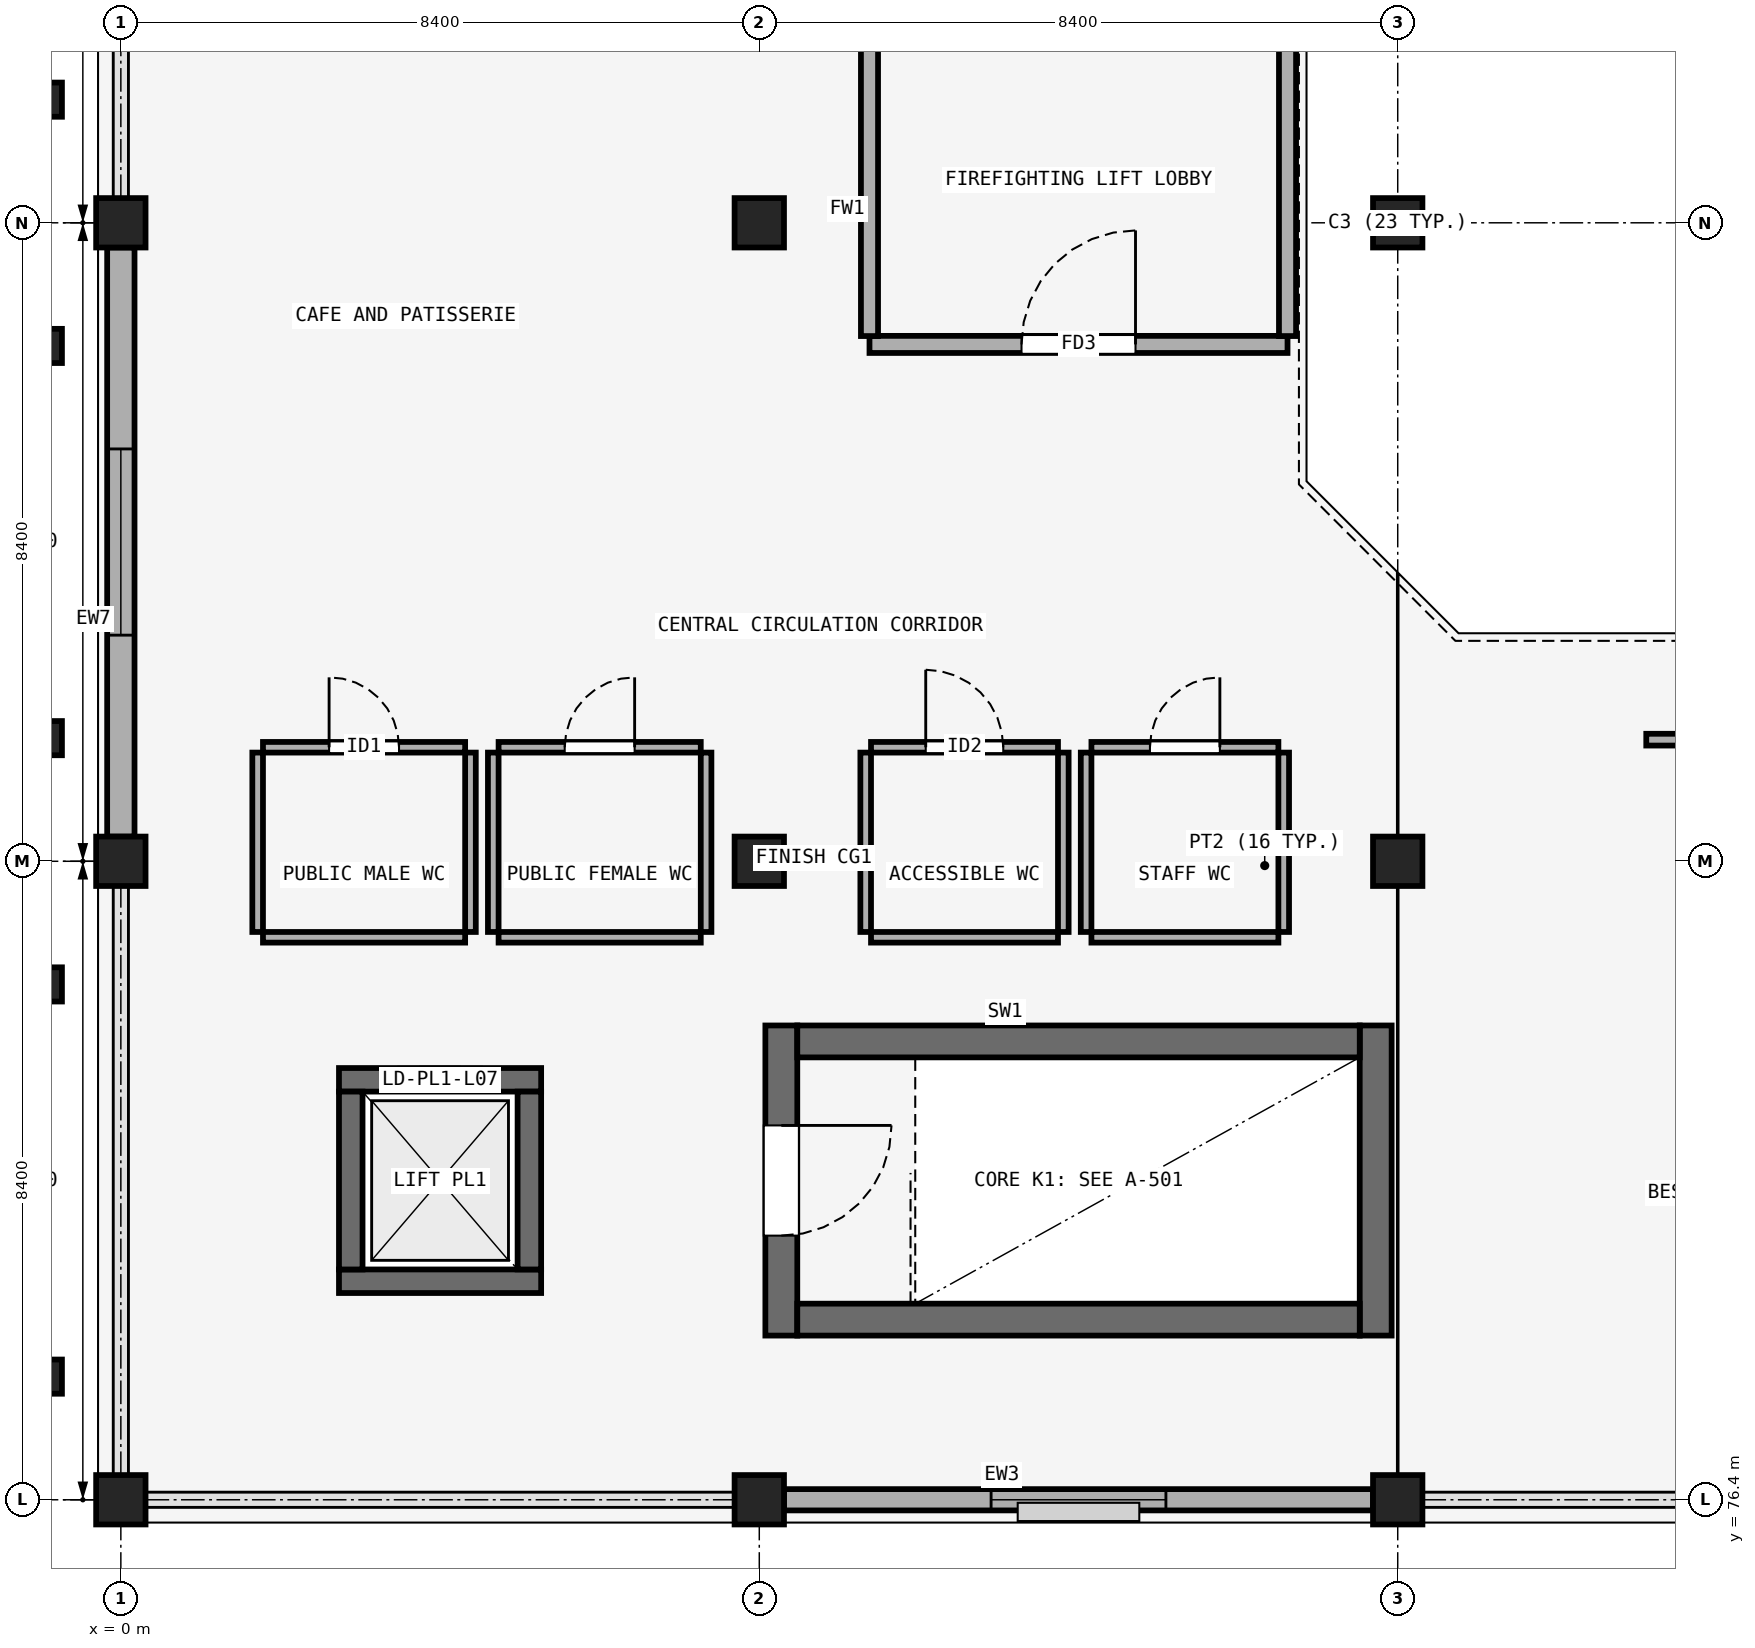
"""IFC4 building model, lengths in metres.
Left out: names, types, materials, properties, quantities, classifications, styles, units other than length and angle.
Written with IfcOpenShell. Run it as: python <this file> out.ifc"""

import sys

from ifc_helpers import new_model, si_unit, direction, frame, frame_2d, origin, origin_2d, place, context, subcontext, project, spatial, rectangle, extrude, element, fill, save


model = new_model("IFC4")
c1 = context("Model", 3, precision=1e-05, world=origin(), true_north=direction((0.0, 1.0)))
c2 = subcontext(c1, "Body", "Model", "MODEL_VIEW")
j1 = project(units=[si_unit("LENGTHUNIT", "METRE"), si_unit("PLANEANGLEUNIT", "RADIAN")], contexts=[c1])
p1 = place(None, origin())
s1 = spatial("IfcSite", under=j1, at=p1, CompositionType="ELEMENT")
p2 = place(p1, origin())
s2 = spatial("IfcBuilding", under=s1, at=p2, CompositionType="ELEMENT")
p3 = place(p2, frame((0.0, 0.0, 32.4)))
s3 = spatial("IfcBuildingStorey", under=s2, at=p3, CompositionType="ELEMENT", Elevation=32.4)
for number, where, z_axis, x_axis in (
    (1, (0.0, 76.4, 0.0), (0.0, 0.0, 1.0), (1.0, 0.0, 0.0)),
    (2, (8.4, 76.4, 0.0), (0.0, 0.0, 1.0), (1.0, 0.0, 0.0)),
    (3, (16.8, 76.4, 0.0), (0.0, 0.0, 1.0), (1.0, 0.0, 0.0)),
    (4, (0.0, 84.8, 0.0), (0.0, 0.0, 1.0), (1.0, 0.0, 0.0)),
    (5, (8.4, 84.8, 0.0), (0.0, 0.0, 1.0), (1.0, 0.0, 0.0)),
    (6, (16.8, 84.8, 0.0), (0.0, 0.0, 1.0), (1.0, 0.0, 0.0)),
    (7, (0.0, 93.2, 0.0), (0.0, 0.0, 1.0), (1.0, 0.0, 0.0)),
    (8, (8.4, 93.2, 0.0), (0.0, 0.0, 1.0), (1.0, 0.0, 0.0)),
    (9, (16.8, 93.2, 0.0), (0.0, 0.0, 1.0), (1.0, 0.0, 0.0)),
):
    element("IfcColumn", number, at=place(p3, frame(where, z_axis=z_axis, x_axis=x_axis)), inside=s3, PredefinedType="COLUMN", context=c2, shape_type="SweptSolid", body=[
        extrude(rectangle(XDim=0.65, YDim=0.65, at=origin_2d()), origin(), (0.0, 0.0, 1.0), 4.5),
    ])
for number, where, z_axis, x_axis in (
    (10, (-1.05, 78.02, 0.0), (0.0, 0.0, 1.0), (0.0, 1.0, 0.0)),
    (11, (-1.05, 83.18, 0.0), (0.0, 0.0, 1.0), (0.0, 1.0, 0.0)),
    (12, (-1.05, 86.42, 0.0), (0.0, 0.0, 1.0), (0.0, 1.0, 0.0)),
    (13, (-1.05, 91.58, 0.0), (0.0, 0.0, 1.0), (0.0, 1.0, 0.0)),
    (14, (-1.05, 94.82, 0.0), (0.0, 0.0, 1.0), (0.0, 1.0, 0.0)),
):
    element("IfcColumn", number, at=place(p3, frame(where, z_axis=z_axis, x_axis=x_axis)), inside=s3, PredefinedType="PILASTER", context=c2, shape_type="SweptSolid", body=[
        extrude(rectangle(XDim=0.45, YDim=0.55, at=origin_2d()), origin(), (0.0, 0.0, 1.0), 4.5),
    ])
p4 = place(p3, frame((8.725, 76.4, 0.0), z_axis=(0.0, 0.0, 1.0), x_axis=(1.0, 0.0, 0.0)))
e15 = element("IfcWall", 15, at=p4, inside=s3, PredefinedType="SOLIDWALL", context=c2, shape_type="SweptSolid", body=[
    extrude(rectangle(XDim=7.75, YDim=0.28, at=frame_2d((3.875, 0.0))), origin(), (0.0, 0.0, 1.0), 3.49),
])
p5 = place(p4, frame((2.725, 0.0, 0.95)))
e16 = element("IfcOpeningElement", 16, at=p5, cuts=e15, PredefinedType="OPENING", context=c2, shape_type="SweptSolid", body=[
    extrude(rectangle(XDim=2.3, YDim=1.35, at=frame_2d((1.15, 0.675))), frame((0.0, 0.15, 0.0), z_axis=(0.0, -1.0, 0.0), x_axis=(1.0, 0.0, 0.0)), (0.0, 0.0, 1.0), 0.3),
])
p6 = place(p3, frame((0.0, 85.125, 0.0), z_axis=(0.0, 0.0, 1.0), x_axis=(0.0, 1.0, 0.0)))
e17 = element("IfcWall", 17, at=p6, inside=s3, PredefinedType="SOLIDWALL", context=c2, shape_type="SweptSolid", body=[
    extrude(rectangle(XDim=7.75, YDim=0.36, at=frame_2d((3.875, 0.0))), origin(), (0.0, 0.0, 1.0), 3.49),
])
p7 = place(p6, frame((2.65, 0.0, 0.95)))
e18 = element("IfcOpeningElement", 18, at=p7, cuts=e17, PredefinedType="OPENING", context=c2, shape_type="SweptSolid", body=[
    extrude(rectangle(XDim=2.45, YDim=1.35, at=frame_2d((1.225, 0.675))), frame((0.0, 0.19, 0.0), z_axis=(0.0, -1.0, 0.0), x_axis=(1.0, 0.0, 0.0)), (0.0, 0.0, 1.0), 0.38),
])
p8 = place(p3, frame((8.69, 82.64, 0.0), z_axis=(0.0, 0.0, 1.0), x_axis=(0.0, -1.0, 0.0)))
e19 = element("IfcWall", 19, at=p8, inside=s3, PredefinedType="SHEAR", context=c2, shape_type="SweptSolid", body=[
    extrude(rectangle(XDim=4.08, YDim=0.42, at=frame_2d((2.04, 0.0))), origin(), (0.0, 0.0, 1.0), 4.24),
])
p9 = place(p8, frame((1.315, 0.0, 0.0)))
e20 = element("IfcOpeningElement", 20, at=p9, cuts=e19, PredefinedType="OPENING", context=c2, shape_type="SweptSolid", body=[
    extrude(rectangle(XDim=1.45, YDim=2.2, at=frame_2d((0.725, 1.1))), frame((0.0, 0.22, 0.0), z_axis=(0.0, -1.0, 0.0), x_axis=(1.0, 0.0, 0.0)), (0.0, 0.0, 1.0), 0.44),
])
p10 = place(p3, frame((16.51, 78.56, 0.0), z_axis=(0.0, 0.0, 1.0), x_axis=(0.0, 1.0, 0.0)))
e21 = element("IfcWall", 21, at=p10, inside=s3, PredefinedType="SHEAR", context=c2, shape_type="SweptSolid", body=[
    extrude(rectangle(XDim=4.08, YDim=0.42, at=frame_2d((2.04, 0.0))), origin(), (0.0, 0.0, 1.0), 4.24),
])
for number, where, z_axis, x_axis in (
    (22, (8.9, 78.77, 0.0), (0.0, 0.0, 1.0), (1.0, 0.0, 0.0)),
    (23, (8.9, 82.43, 0.0), (0.0, 0.0, 1.0), (1.0, 0.0, 0.0)),
):
    element("IfcWall", number, at=place(p3, frame(where, z_axis=z_axis, x_axis=x_axis)), inside=s3, PredefinedType="SHEAR", context=c2, shape_type="SweptSolid", body=[
        extrude(rectangle(XDim=7.4, YDim=0.42, at=frame_2d((3.7, 0.0))), origin(), (0.0, 0.0, 1.0), 4.24),
    ])
p11 = place(p3, frame((2.87, 79.275, 0.0), z_axis=(0.0, 0.0, 1.0), x_axis=(1.0, 0.0, 0.0)))
e24 = element("IfcWall", 24, at=p11, inside=s3, PredefinedType="SHEAR", context=c2, shape_type="SweptSolid", body=[
    extrude(rectangle(XDim=2.66, YDim=0.31, at=frame_2d((1.33, 0.0))), origin(), (0.0, 0.0, 1.0), 5.9),
])
p12 = place(p3, frame((2.87, 81.925, 0.0), z_axis=(0.0, 0.0, 1.0), x_axis=(1.0, 0.0, 0.0)))
e25 = element("IfcWall", 25, at=p12, inside=s3, PredefinedType="SHEAR", context=c2, shape_type="SweptSolid", body=[
    extrude(rectangle(XDim=2.66, YDim=0.31, at=frame_2d((1.33, 0.0))), origin(), (0.0, 0.0, 1.0), 5.9),
])
p13 = place(p12, frame((0.78, 0.0, 0.0)))
e26 = element("IfcOpeningElement", 26, at=p13, cuts=e25, PredefinedType="OPENING", context=c2, shape_type="SweptSolid", body=[
    extrude(rectangle(XDim=1.1, YDim=2.2, at=frame_2d((0.55, 1.1))), frame((0.0, 0.165, 0.0), z_axis=(0.0, -1.0, 0.0), x_axis=(1.0, 0.0, 0.0)), (0.0, 0.0, 1.0), 0.33),
])
for number, where, z_axis, x_axis in (
    (27, (3.025, 79.43, 0.0), (0.0, 0.0, 1.0), (0.0, 1.0, 0.0)),
    (28, (5.375, 79.43, 0.0), (0.0, 0.0, 1.0), (0.0, 1.0, 0.0)),
):
    element("IfcWall", number, at=place(p3, frame(where, z_axis=z_axis, x_axis=x_axis)), inside=s3, PredefinedType="SHEAR", context=c2, shape_type="SweptSolid", body=[
        extrude(rectangle(XDim=2.34, YDim=0.31, at=frame_2d((1.17, 0.0))), origin(), (0.0, 0.0, 1.0), 5.9),
    ])
p14 = place(p3, frame((9.85, 91.6, 0.0), z_axis=(0.0, 0.0, 1.0), x_axis=(1.0, 0.0, 0.0)))
e29 = element("IfcWall", 29, at=p14, inside=s3, PredefinedType="PARTITIONING", context=c2, shape_type="SweptSolid", body=[
    extrude(rectangle(XDim=5.5, YDim=0.225, at=frame_2d((2.75, 0.0))), origin(), (0.0, 0.0, 1.0), 4.24),
])
p15 = place(p14, frame((2.0, 0.0, 0.0)))
e30 = element("IfcOpeningElement", 30, at=p15, cuts=e29, PredefinedType="OPENING", context=c2, shape_type="SweptSolid", body=[
    extrude(rectangle(XDim=1.5, YDim=2.25, at=frame_2d((0.75, 1.125))), frame((0.0, 0.123, 0.0), z_axis=(0.0, -1.0, 0.0), x_axis=(1.0, 0.0, 0.0)), (0.0, 0.0, 1.0), 0.245),
])
for number, where, z_axis, x_axis in (
    (31, (9.85, 91.71, 0.0), (0.0, 0.0, 1.0), (0.0, 1.0, 0.0)),
    (32, (15.35, 91.71, 0.0), (0.0, 0.0, 1.0), (0.0, 1.0, 0.0)),
):
    element("IfcWall", number, at=place(p3, frame(where, z_axis=z_axis, x_axis=x_axis)), inside=s3, PredefinedType="PARTITIONING", context=c2, shape_type="SweptSolid", body=[
        extrude(rectangle(XDim=4.53, YDim=0.225, at=frame_2d((2.265, 0.0))), origin(), (0.0, 0.0, 1.0), 3.54),
    ])
p16 = place(p3, frame((1.87, 86.3, 0.0), z_axis=(0.0, 0.0, 1.0), x_axis=(1.0, 0.0, 0.0)))
e33 = element("IfcWall", 33, at=p16, inside=s3, PredefinedType="PARTITIONING", context=c2, shape_type="SweptSolid", body=[
    extrude(rectangle(XDim=2.66, YDim=0.14, at=frame_2d((1.33, 0.0))), origin(), (0.0, 0.0, 1.0), 4.24),
])
p17 = place(p16, frame((0.87, 0.0, 0.0)))
e34 = element("IfcOpeningElement", 34, at=p17, cuts=e33, PredefinedType="OPENING", context=c2, shape_type="SweptSolid", body=[
    extrude(rectangle(XDim=0.92, YDim=2.12, at=frame_2d((0.46, 1.06))), frame((0.0, 0.08, 0.0), z_axis=(0.0, -1.0, 0.0), x_axis=(1.0, 0.0, 0.0)), (0.0, 0.0, 1.0), 0.16),
])
p18 = place(p3, frame((1.87, 83.8, 0.0), z_axis=(0.0, 0.0, 1.0), x_axis=(1.0, 0.0, 0.0)))
e35 = element("IfcWall", 35, at=p18, inside=s3, PredefinedType="PARTITIONING", context=c2, shape_type="SweptSolid", body=[
    extrude(rectangle(XDim=2.66, YDim=0.14, at=frame_2d((1.33, 0.0))), origin(), (0.0, 0.0, 1.0), 4.24),
])
for number, where, z_axis, x_axis in (
    (36, (1.8, 83.87, 0.0), (0.0, 0.0, 1.0), (0.0, 1.0, 0.0)),
    (37, (4.6, 83.87, 0.0), (0.0, 0.0, 1.0), (0.0, 1.0, 0.0)),
):
    element("IfcWall", number, at=place(p3, frame(where, z_axis=z_axis, x_axis=x_axis)), inside=s3, PredefinedType="PARTITIONING", context=c2, shape_type="SweptSolid", body=[
        extrude(rectangle(XDim=2.36, YDim=0.14, at=frame_2d((1.18, 0.0))), origin(), (0.0, 0.0, 1.0), 3.49),
    ])
p19 = place(p3, frame((4.97, 86.3, 0.0), z_axis=(0.0, 0.0, 1.0), x_axis=(1.0, 0.0, 0.0)))
e38 = element("IfcWall", 38, at=p19, inside=s3, PredefinedType="PARTITIONING", context=c2, shape_type="SweptSolid", body=[
    extrude(rectangle(XDim=2.66, YDim=0.14, at=frame_2d((1.33, 0.0))), origin(), (0.0, 0.0, 1.0), 4.24),
])
p20 = place(p19, frame((0.87, 0.0, 0.0)))
e39 = element("IfcOpeningElement", 39, at=p20, cuts=e38, PredefinedType="OPENING", context=c2, shape_type="SweptSolid", body=[
    extrude(rectangle(XDim=0.92, YDim=2.12, at=frame_2d((0.46, 1.06))), frame((0.0, 0.08, 0.0), z_axis=(0.0, -1.0, 0.0), x_axis=(1.0, 0.0, 0.0)), (0.0, 0.0, 1.0), 0.16),
])
p21 = place(p3, frame((4.97, 83.8, 0.0), z_axis=(0.0, 0.0, 1.0), x_axis=(1.0, 0.0, 0.0)))
e40 = element("IfcWall", 40, at=p21, inside=s3, PredefinedType="PARTITIONING", context=c2, shape_type="SweptSolid", body=[
    extrude(rectangle(XDim=2.66, YDim=0.14, at=frame_2d((1.33, 0.0))), origin(), (0.0, 0.0, 1.0), 4.24),
])
for number, where, z_axis, x_axis in (
    (41, (4.9, 83.87, 0.0), (0.0, 0.0, 1.0), (0.0, 1.0, 0.0)),
    (42, (7.7, 83.87, 0.0), (0.0, 0.0, 1.0), (0.0, 1.0, 0.0)),
):
    element("IfcWall", number, at=place(p3, frame(where, z_axis=z_axis, x_axis=x_axis)), inside=s3, PredefinedType="PARTITIONING", context=c2, shape_type="SweptSolid", body=[
        extrude(rectangle(XDim=2.36, YDim=0.14, at=frame_2d((1.18, 0.0))), origin(), (0.0, 0.0, 1.0), 3.49),
    ])
p22 = place(p3, frame((9.87, 86.3, 0.0), z_axis=(0.0, 0.0, 1.0), x_axis=(1.0, 0.0, 0.0)))
e43 = element("IfcWall", 43, at=p22, inside=s3, PredefinedType="PARTITIONING", context=c2, shape_type="SweptSolid", body=[
    extrude(rectangle(XDim=2.46, YDim=0.14, at=frame_2d((1.23, 0.0))), origin(), (0.0, 0.0, 1.0), 4.24),
])
p23 = place(p22, frame((0.72, 0.0, 0.0)))
e44 = element("IfcOpeningElement", 44, at=p23, cuts=e43, PredefinedType="OPENING", context=c2, shape_type="SweptSolid", body=[
    extrude(rectangle(XDim=1.02, YDim=2.15, at=frame_2d((0.51, 1.075))), frame((0.0, 0.08, 0.0), z_axis=(0.0, -1.0, 0.0), x_axis=(1.0, 0.0, 0.0)), (0.0, 0.0, 1.0), 0.16),
])
p24 = place(p3, frame((9.87, 83.8, 0.0), z_axis=(0.0, 0.0, 1.0), x_axis=(1.0, 0.0, 0.0)))
e45 = element("IfcWall", 45, at=p24, inside=s3, PredefinedType="PARTITIONING", context=c2, shape_type="SweptSolid", body=[
    extrude(rectangle(XDim=2.46, YDim=0.14, at=frame_2d((1.23, 0.0))), origin(), (0.0, 0.0, 1.0), 4.24),
])
for number, where, z_axis, x_axis in (
    (46, (9.8, 83.87, 0.0), (0.0, 0.0, 1.0), (0.0, 1.0, 0.0)),
    (47, (12.4, 83.87, 0.0), (0.0, 0.0, 1.0), (0.0, 1.0, 0.0)),
):
    element("IfcWall", number, at=place(p3, frame(where, z_axis=z_axis, x_axis=x_axis)), inside=s3, PredefinedType="PARTITIONING", context=c2, shape_type="SweptSolid", body=[
        extrude(rectangle(XDim=2.36, YDim=0.14, at=frame_2d((1.18, 0.0))), origin(), (0.0, 0.0, 1.0), 3.49),
    ])
p25 = place(p3, frame((12.77, 86.3, 0.0), z_axis=(0.0, 0.0, 1.0), x_axis=(1.0, 0.0, 0.0)))
e48 = element("IfcWall", 48, at=p25, inside=s3, PredefinedType="PARTITIONING", context=c2, shape_type="SweptSolid", body=[
    extrude(rectangle(XDim=2.46, YDim=0.14, at=frame_2d((1.23, 0.0))), origin(), (0.0, 0.0, 1.0), 4.24),
])
p26 = place(p25, frame((0.77, 0.0, 0.0)))
e49 = element("IfcOpeningElement", 49, at=p26, cuts=e48, PredefinedType="OPENING", context=c2, shape_type="SweptSolid", body=[
    extrude(rectangle(XDim=0.92, YDim=2.12, at=frame_2d((0.46, 1.06))), frame((0.0, 0.08, 0.0), z_axis=(0.0, -1.0, 0.0), x_axis=(1.0, 0.0, 0.0)), (0.0, 0.0, 1.0), 0.16),
])
p27 = place(p3, frame((12.77, 83.8, 0.0), z_axis=(0.0, 0.0, 1.0), x_axis=(1.0, 0.0, 0.0)))
e50 = element("IfcWall", 50, at=p27, inside=s3, PredefinedType="PARTITIONING", context=c2, shape_type="SweptSolid", body=[
    extrude(rectangle(XDim=2.46, YDim=0.14, at=frame_2d((1.23, 0.0))), origin(), (0.0, 0.0, 1.0), 4.24),
])
for number, where, z_axis, x_axis in (
    (51, (12.7, 83.87, 0.0), (0.0, 0.0, 1.0), (0.0, 1.0, 0.0)),
    (52, (15.3, 83.87, 0.0), (0.0, 0.0, 1.0), (0.0, 1.0, 0.0)),
):
    element("IfcWall", number, at=place(p3, frame(where, z_axis=z_axis, x_axis=x_axis)), inside=s3, PredefinedType="PARTITIONING", context=c2, shape_type="SweptSolid", body=[
        extrude(rectangle(XDim=2.36, YDim=0.14, at=frame_2d((1.18, 0.0))), origin(), (0.0, 0.0, 1.0), 3.49),
    ])
p28 = place(p3, frame((20.07, 86.4, 0.0), z_axis=(0.0, 0.0, 1.0), x_axis=(1.0, 0.0, 0.0)))
e53 = element("IfcWall", 53, at=p28, inside=s3, PredefinedType="PARTITIONING", context=c2, shape_type="SweptSolid", body=[
    extrude(rectangle(XDim=6.235, YDim=0.155, at=frame_2d((3.117, 0.0))), origin(), (0.0, 0.0, 1.0), 3.54),
])
p29 = place(p5, origin())
e54 = element("IfcWindow", 54, at=p29, inside=s3, PartitioningType="DOUBLE_PANEL_VERTICAL", PredefinedType="WINDOW", context=c2, shape_type="SweptSolid", body=[
    extrude(rectangle(XDim=2.3, YDim=1.35, at=frame_2d((1.15, 0.675))), frame((0.0, 0.03, 0.0), z_axis=(0.0, -1.0, 0.0), x_axis=(1.0, 0.0, 0.0)), (0.0, 0.0, 1.0), 0.06),
])
fill(e16, e54)
p30 = place(p7, origin())
e55 = element("IfcWindow", 55, at=p30, inside=s3, PartitioningType="DOUBLE_PANEL_VERTICAL", PredefinedType="WINDOW", context=c2, shape_type="SweptSolid", body=[
    extrude(rectangle(XDim=2.45, YDim=1.35, at=frame_2d((1.225, 0.675))), frame((0.0, 0.03, 0.0), z_axis=(0.0, -1.0, 0.0), x_axis=(1.0, 0.0, 0.0)), (0.0, 0.0, 1.0), 0.06),
])
fill(e18, e55)
p31 = place(p9, origin())
e56 = element("IfcDoor", 56, at=p31, inside=s3, OperationType="SINGLE_SWING_LEFT", PredefinedType="DOOR", context=c2, shape_type="SweptSolid", body=[
    extrude(rectangle(XDim=1.45, YDim=2.2, at=frame_2d((0.725, 1.1))), frame((0.0, 0.025, 0.0), z_axis=(0.0, -1.0, 0.0), x_axis=(1.0, 0.0, 0.0)), (0.0, 0.0, 1.0), 0.05),
])
fill(e20, e56)
p32 = place(p13, origin())
e57 = element("IfcDoor", 57, at=p32, inside=s3, OperationType="SLIDING_TO_LEFT", PredefinedType="DOOR", context=c2, shape_type="SweptSolid", body=[
    extrude(rectangle(XDim=1.1, YDim=2.2, at=frame_2d((0.55, 1.1))), frame((0.0, 0.025, 0.0), z_axis=(0.0, -1.0, 0.0), x_axis=(1.0, 0.0, 0.0)), (0.0, 0.0, 1.0), 0.05),
])
fill(e26, e57)
p33 = place(p15, origin())
e58 = element("IfcDoor", 58, at=p33, inside=s3, OperationType="SINGLE_SWING_RIGHT", PredefinedType="DOOR", context=c2, shape_type="SweptSolid", body=[
    extrude(rectangle(XDim=1.5, YDim=2.25, at=frame_2d((0.75, 1.125))), frame((0.0, 0.025, 0.0), z_axis=(0.0, -1.0, 0.0), x_axis=(1.0, 0.0, 0.0)), (0.0, 0.0, 1.0), 0.05),
])
fill(e30, e58)
p34 = place(p17, origin())
e59 = element("IfcDoor", 59, at=p34, inside=s3, OperationType="SINGLE_SWING_LEFT", PredefinedType="DOOR", context=c2, shape_type="SweptSolid", body=[
    extrude(rectangle(XDim=0.92, YDim=2.12, at=frame_2d((0.46, 1.06))), frame((0.0, 0.025, 0.0), z_axis=(0.0, -1.0, 0.0), x_axis=(1.0, 0.0, 0.0)), (0.0, 0.0, 1.0), 0.05),
])
fill(e34, e59)
p35 = place(p20, origin())
e60 = element("IfcDoor", 60, at=p35, inside=s3, OperationType="SINGLE_SWING_RIGHT", PredefinedType="DOOR", context=c2, shape_type="SweptSolid", body=[
    extrude(rectangle(XDim=0.92, YDim=2.12, at=frame_2d((0.46, 1.06))), frame((0.0, 0.025, 0.0), z_axis=(0.0, -1.0, 0.0), x_axis=(1.0, 0.0, 0.0)), (0.0, 0.0, 1.0), 0.05),
])
fill(e39, e60)
p36 = place(p23, origin())
e61 = element("IfcDoor", 61, at=p36, inside=s3, OperationType="SINGLE_SWING_LEFT", PredefinedType="DOOR", context=c2, shape_type="SweptSolid", body=[
    extrude(rectangle(XDim=1.02, YDim=2.15, at=frame_2d((0.51, 1.075))), frame((0.0, 0.025, 0.0), z_axis=(0.0, -1.0, 0.0), x_axis=(1.0, 0.0, 0.0)), (0.0, 0.0, 1.0), 0.05),
])
fill(e44, e61)
p37 = place(p26, origin())
e62 = element("IfcDoor", 62, at=p37, inside=s3, OperationType="SINGLE_SWING_RIGHT", PredefinedType="DOOR", context=c2, shape_type="SweptSolid", body=[
    extrude(rectangle(XDim=0.92, YDim=2.12, at=frame_2d((0.46, 1.06))), frame((0.0, 0.025, 0.0), z_axis=(0.0, -1.0, 0.0), x_axis=(1.0, 0.0, 0.0)), (0.0, 0.0, 1.0), 0.05),
])
fill(e49, e62)
save(model, sys.argv[1])
